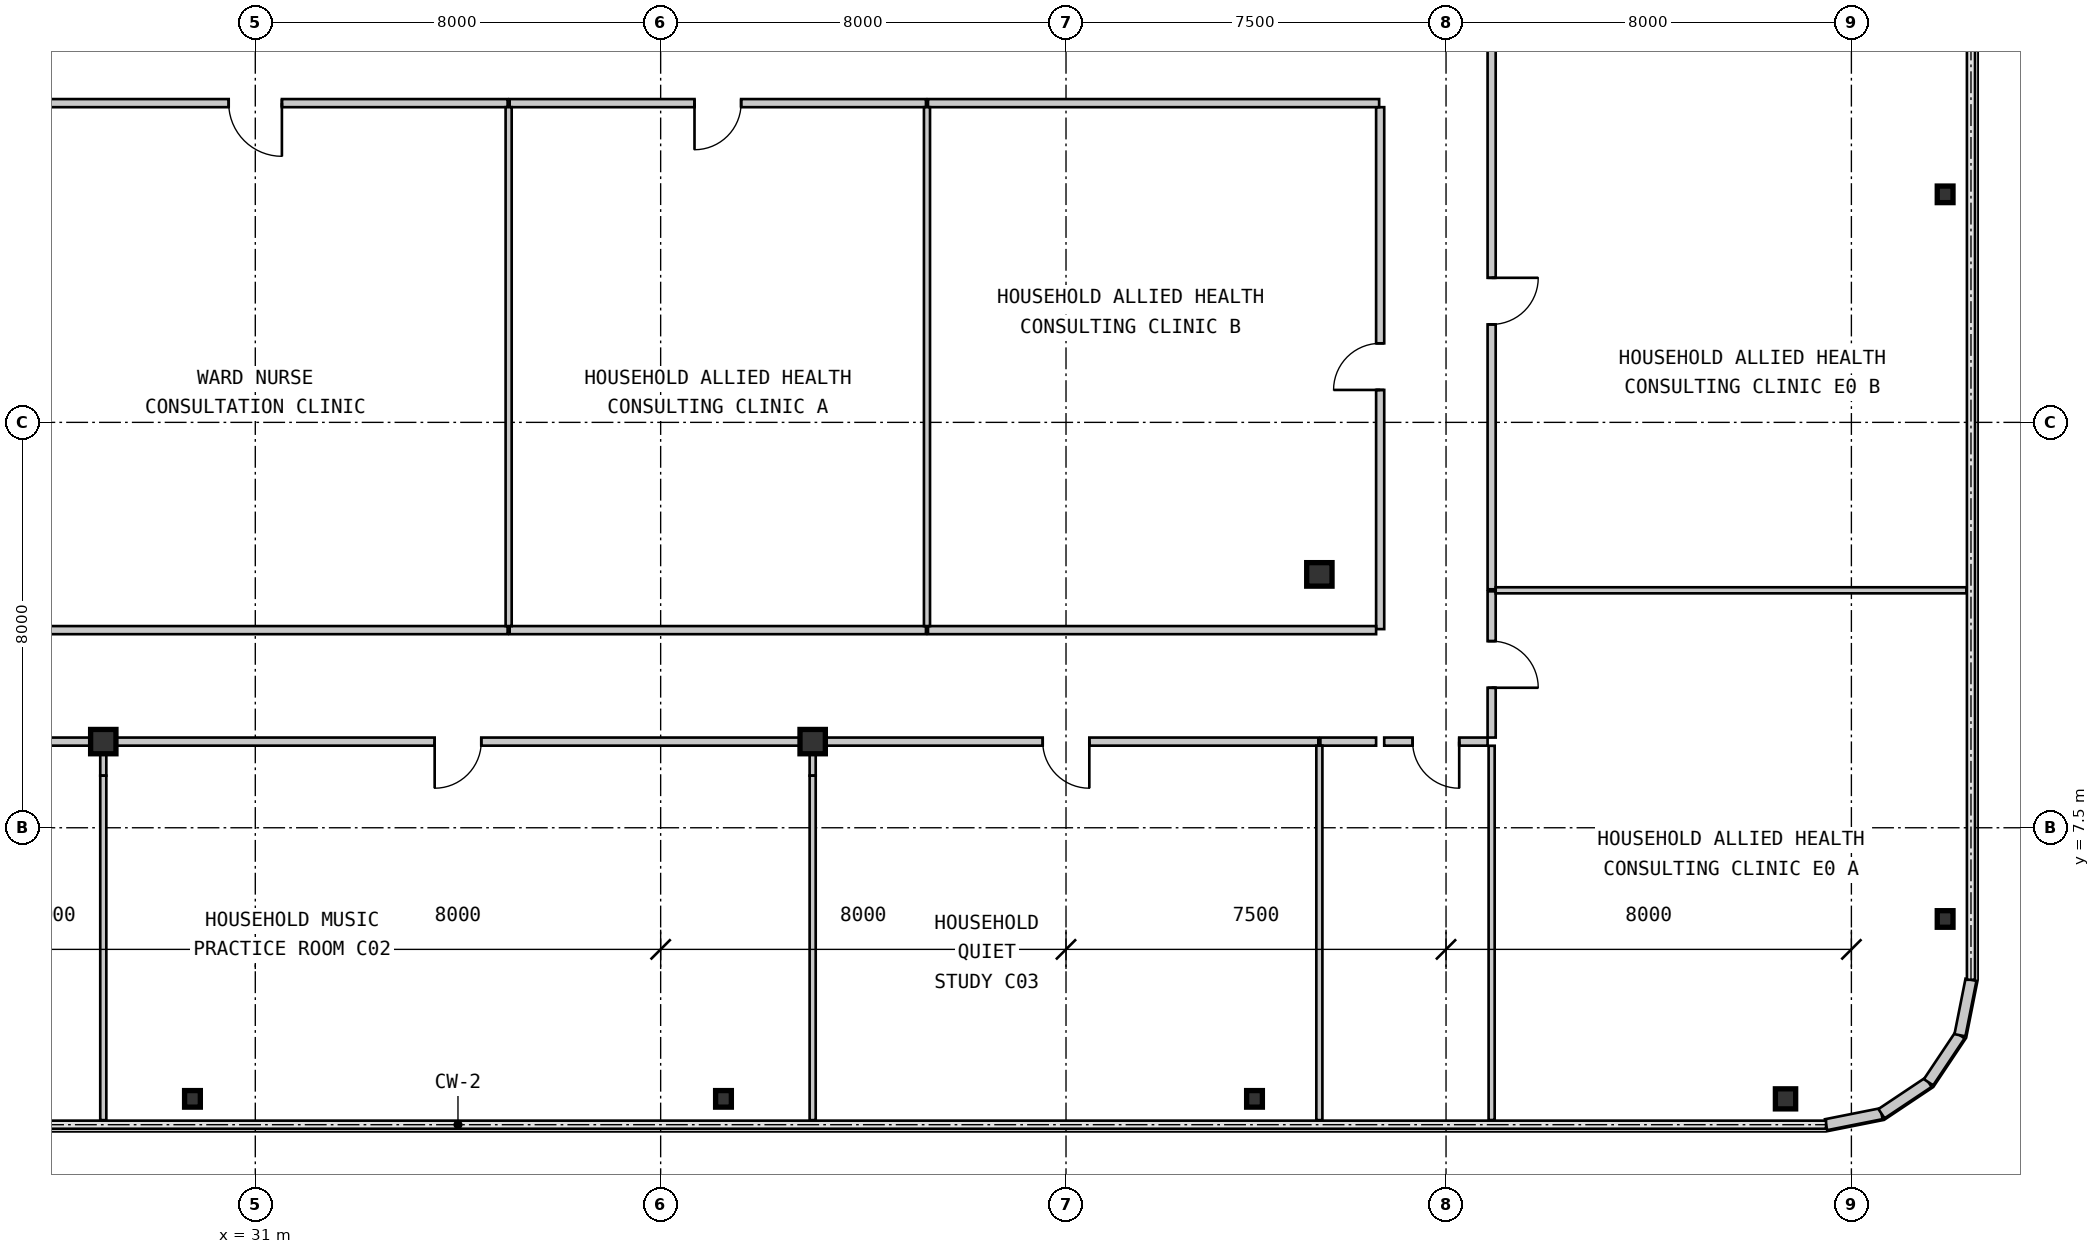
"""IFC4 building model, lengths in metres.
Left out: names, types, materials, properties, quantities, classifications, styles, units other than length and angle.
Written with IfcOpenShell. Run it as: python <this file> out.ifc"""

import sys

from ifc_helpers import new_model, si_unit, direction, frame, frame_2d, origin, origin_2d, place, context, subcontext, project, spatial, rectangle, i_section, extrude, source, transform, mapped, element, fill, save


model = new_model("IFC4")
c1 = context("Model", 3, precision=1e-05, world=origin(), true_north=direction((0.0, 1.0)))
c2 = subcontext(c1, "Body", "Model", "MODEL_VIEW")
j1 = project(units=[si_unit("LENGTHUNIT", "METRE"), si_unit("PLANEANGLEUNIT", "RADIAN")], contexts=[c1])
p1 = place(None, origin())
s1 = spatial("IfcSite", under=j1, at=p1, CompositionType="ELEMENT")
p2 = place(p1, origin())
s2 = spatial("IfcBuilding", under=s1, at=p2, CompositionType="ELEMENT")
p3 = place(p2, frame((0.0, 0.0, 57.75)))
s3 = spatial("IfcBuildingStorey", under=s2, at=p3, CompositionType="ELEMENT", Elevation=57.75)
m1 = source(origin(), c2, "Body", "SweptSolid", [
    extrude(i_section(OverallWidth=0.5, OverallDepth=0.48, WebThickness=0.028, FlangeThickness=0.044, at=origin_2d()), origin(), (0.0, 0.0, 1.0), 3.15),
])
for number, where, z_axis, x_axis in (
    (1, (28.0, 9.2, 0.0), (0.0, 0.0, 1.0), (1.0, 0.0, 0.0)),
    (2, (42.0, 9.2, 0.0), (0.0, 0.0, 1.0), (1.0, 0.0, 0.0)),
):
    element("IfcColumn", number, at=place(p3, frame(where, z_axis=z_axis, x_axis=x_axis)), inside=s3, PredefinedType="COLUMN", context=c2, shape_type="MappedRepresentation", body=[
        mapped(m1, transform((0.0, 0.0, 0.0), scale=1.0)),
    ])
m2 = source(origin(), c2, "Body", "SweptSolid", [
    extrude(i_section(OverallWidth=0.5, OverallDepth=0.464, WebThickness=0.022, FlangeThickness=0.034, at=origin_2d()), origin(), (0.0, 0.0, 1.0), 3.15),
])
p4 = place(p3, frame((52.0, 12.5, 0.0), z_axis=(0.0, 0.0, 1.0), x_axis=(1.0, 0.0, 0.0)))
e3 = element("IfcColumn", 3, at=p4, inside=s3, PredefinedType="COLUMN", context=c2, shape_type="MappedRepresentation", body=[
    mapped(m2, transform((0.0, 0.0, 0.0), scale=1.0)),
])
m3 = source(origin(), c2, "Body", "SweptSolid", [
    extrude(i_section(OverallWidth=0.311, OverallDepth=0.327, WebThickness=0.016, FlangeThickness=0.025, at=origin_2d()), origin(), (0.0, 0.0, 1.0), 3.15),
])
for number, where, z_axis, x_axis in (
    (4, (29.76, 2.15, 0.0), (0.0, 0.0, 1.0), (1.0, 0.0, 0.0)),
    (5, (40.24, 2.15, 0.0), (0.0, 0.0, 1.0), (1.0, 0.0, 0.0)),
    (6, (50.72, 2.15, 0.0), (0.0, 0.0, 1.0), (1.0, 0.0, 0.0)),
):
    element("IfcColumn", number, at=place(p3, frame(where, z_axis=z_axis, x_axis=x_axis)), inside=s3, PredefinedType="COLUMN", context=c2, shape_type="MappedRepresentation", body=[
        mapped(m3, transform((0.0, 0.0, 0.0), scale=1.0)),
    ])
m4 = source(origin(), c2, "Body", "SweptSolid", [
    extrude(i_section(OverallWidth=0.4, OverallDepth=0.396, WebThickness=0.022, FlangeThickness=0.034, at=origin_2d()), origin(), (0.0, 0.0, 1.0), 3.15),
])
p5 = place(p3, frame((61.2, 2.15, 0.0), z_axis=(0.0, 0.0, 1.0), x_axis=(1.0, 0.0, 0.0)))
e7 = element("IfcColumn", 7, at=p5, inside=s3, PredefinedType="COLUMN", context=c2, shape_type="MappedRepresentation", body=[
    mapped(m4, transform((0.0, 0.0, 0.0), scale=1.0)),
])
for number, where, z_axis, x_axis in (
    (8, (64.35, 5.7, 0.0), (0.0, 0.0, 1.0), (1.0, 0.0, 0.0)),
    (9, (64.35, 20.0, 0.0), (0.0, 0.0, 1.0), (1.0, 0.0, 0.0)),
):
    element("IfcColumn", number, at=place(p3, frame(where, z_axis=z_axis, x_axis=x_axis)), inside=s3, PredefinedType="COLUMN", context=c2, shape_type="MappedRepresentation", body=[
        mapped(m3, transform((0.0, 0.0, 0.0), scale=1.0)),
    ])
m5 = source(origin(), c2, "Body", "SweptSolid", [
    extrude(rectangle(XDim=1.116, YDim=0.22, at=frame_2d((0.558, 0.0))), origin(), (0.0, 0.0, 1.0), 2.87),
])
for number, where, z_axis, x_axis in (
    (10, (62.0, 1.64, 0.0), (0.0, 0.0, 1.0), (0.981, 0.195, 0.0)),
    (11, (63.094, 1.858, 0.0), (0.0, 0.0, 1.0), (0.831, 0.556, 0.0)),
    (12, (64.022, 2.478, 0.0), (0.0, 0.0, 1.0), (0.556, 0.831, 0.0)),
    (13, (64.642, 3.406, 0.0), (0.0, 0.0, 1.0), (0.195, 0.981, 0.0)),
):
    element("IfcWall", number, at=place(p3, frame(where, z_axis=z_axis, x_axis=x_axis)), inside=s3, PredefinedType="SOLIDWALL", context=c2, shape_type="MappedRepresentation", body=[
        mapped(m5, transform((0.0, 0.0, 0.0), scale=1.0)),
    ])
m6 = source(origin(), c2, "Body", "SweptSolid", [
    extrude(rectangle(XDim=9.959, YDim=0.16, at=frame_2d((4.98, 0.0))), origin(), (0.0, 0.0, 1.0), 2.87),
])
p6 = place(p3, frame((35.98, 21.8, 0.0), z_axis=(0.0, 0.0, 1.0), x_axis=(-1.0, 0.0, 0.0)))
e14 = element("IfcWall", 14, at=p6, inside=s3, PredefinedType="PARTITIONING", context=c2, shape_type="MappedRepresentation", body=[
    mapped(m6, transform((0.0, 0.0, 0.0), scale=1.0)),
])
m7 = source(origin(), c2, "Body", "SweptSolid", [
    extrude(rectangle(XDim=1.05, YDim=2.1, at=frame_2d((0.525, 1.05))), frame((0.0, 0.09, 0.0), z_axis=(0.0, -1.0, 0.0), x_axis=(1.0, 0.0, 0.0)), (0.0, 0.0, 1.0), 0.18),
])
p7 = place(p6, frame((4.455, 0.0, 0.0)))
e15 = element("IfcOpeningElement", 15, at=p7, cuts=e14, PredefinedType="OPENING", context=c2, shape_type="MappedRepresentation", body=[
    mapped(m7, transform((0.0, 0.0, 0.0), scale=1.0)),
])
m8 = source(origin(), c2, "Body", "SweptSolid", [
    extrude(rectangle(XDim=8.216, YDim=0.16, at=frame_2d((4.108, 0.0))), origin(), (0.0, 0.0, 1.0), 2.87),
])
p8 = place(p3, frame((44.236, 21.8, 0.0), z_axis=(0.0, 0.0, 1.0), x_axis=(-1.0, 0.0, 0.0)))
e16 = element("IfcWall", 16, at=p8, inside=s3, PredefinedType="PARTITIONING", context=c2, shape_type="MappedRepresentation", body=[
    mapped(m8, transform((0.0, 0.0, 0.0), scale=1.0)),
])
m9 = source(origin(), c2, "Body", "SweptSolid", [
    extrude(rectangle(XDim=0.92, YDim=2.1, at=frame_2d((0.46, 1.05))), frame((0.0, 0.09, 0.0), z_axis=(0.0, -1.0, 0.0), x_axis=(1.0, 0.0, 0.0)), (0.0, 0.0, 1.0), 0.18),
])
p9 = place(p8, frame((3.648, 0.0, 0.0)))
e17 = element("IfcOpeningElement", 17, at=p9, cuts=e16, PredefinedType="OPENING", context=c2, shape_type="MappedRepresentation", body=[
    mapped(m9, transform((0.0, 0.0, 0.0), scale=1.0)),
])
m10 = source(origin(), c2, "Body", "SweptSolid", [
    extrude(rectangle(XDim=10.3, YDim=0.16, at=frame_2d((5.15, 0.0))), origin(), (0.0, 0.0, 1.0), 2.87),
])
p10 = place(p3, frame((53.2, 11.42, 0.0), z_axis=(0.0, 0.0, 1.0), x_axis=(0.0, 1.0, 0.0)))
e18 = element("IfcWall", 18, at=p10, inside=s3, PredefinedType="PARTITIONING", context=c2, shape_type="MappedRepresentation", body=[
    mapped(m10, transform((0.0, 0.0, 0.0), scale=1.0)),
])
p11 = place(p10, frame((4.72, 0.0, 0.0)))
e19 = element("IfcOpeningElement", 19, at=p11, cuts=e18, PredefinedType="OPENING", context=c2, shape_type="MappedRepresentation", body=[
    mapped(m9, transform((0.0, 0.0, 0.0), scale=1.0)),
])
m11 = source(origin(), c2, "Body", "SweptSolid", [
    extrude(rectangle(XDim=8.904, YDim=0.16, at=frame_2d((4.452, 0.0))), origin(), (0.0, 0.0, 1.0), 2.87),
])
p12 = place(p3, frame((53.18, 21.8, 0.0), z_axis=(0.0, 0.0, 1.0), x_axis=(-1.0, 0.0, 0.0)))
e20 = element("IfcWall", 20, at=p12, inside=s3, PredefinedType="PARTITIONING", context=c2, shape_type="MappedRepresentation", body=[
    mapped(m11, transform((0.0, 0.0, 0.0), scale=1.0)),
])
m12 = source(origin(), c2, "Body", "SweptSolid", [
    extrude(rectangle(XDim=2.04, YDim=0.16, at=frame_2d((1.02, 0.0))), origin(), (0.0, 0.0, 1.0), 2.87),
])
p13 = place(p3, frame((55.32, 9.2, 0.0), z_axis=(0.0, 0.0, 1.0), x_axis=(-1.0, 0.0, 0.0)))
e21 = element("IfcWall", 21, at=p13, inside=s3, PredefinedType="PARTITIONING", context=c2, shape_type="MappedRepresentation", body=[
    mapped(m12, transform((0.0, 0.0, 0.0), scale=1.0)),
])
p14 = place(p13, frame((0.56, 0.0, 0.0)))
e22 = element("IfcOpeningElement", 22, at=p14, cuts=e21, PredefinedType="OPENING", context=c2, shape_type="MappedRepresentation", body=[
    mapped(m9, transform((0.0, 0.0, 0.0), scale=1.0)),
])
m13 = source(origin(), c2, "Body", "SweptSolid", [
    extrude(rectangle(XDim=2.886, YDim=0.16, at=frame_2d((1.443, 0.0))), origin(), (0.0, 0.0, 1.0), 2.87),
])
p15 = place(p3, frame((55.4, 12.166, 0.0), z_axis=(0.0, 0.0, 1.0), x_axis=(0.0, -1.0, 0.0)))
e23 = element("IfcWall", 23, at=p15, inside=s3, PredefinedType="PARTITIONING", context=c2, shape_type="MappedRepresentation", body=[
    mapped(m13, transform((0.0, 0.0, 0.0), scale=1.0)),
])
p16 = place(p15, frame((0.983, 0.0, 0.0)))
e24 = element("IfcOpeningElement", 24, at=p16, cuts=e23, PredefinedType="OPENING", context=c2, shape_type="MappedRepresentation", body=[
    mapped(m9, transform((0.0, 0.0, 0.0), scale=1.0)),
])
m14 = source(origin(), c2, "Body", "SweptSolid", [
    extrude(rectangle(XDim=11.373, YDim=0.16, at=frame_2d((5.687, 0.0))), origin(), (0.0, 0.0, 1.0), 2.87),
])
p17 = place(p3, frame((55.4, 23.579, 0.0), z_axis=(0.0, 0.0, 1.0), x_axis=(0.0, -1.0, 0.0)))
e25 = element("IfcWall", 25, at=p17, inside=s3, PredefinedType="PARTITIONING", context=c2, shape_type="MappedRepresentation", body=[
    mapped(m14, transform((0.0, 0.0, 0.0), scale=1.0)),
])
p18 = place(p17, frame((5.227, 0.0, 0.0)))
e26 = element("IfcOpeningElement", 26, at=p18, cuts=e25, PredefinedType="OPENING", context=c2, shape_type="MappedRepresentation", body=[
    mapped(m9, transform((0.0, 0.0, 0.0), scale=1.0)),
])
p19 = place(p3, frame((26.02, 11.4, 0.0), z_axis=(0.0, 0.0, 1.0), x_axis=(1.0, 0.0, 0.0)))
e27 = element("IfcWall", 27, at=p19, inside=s3, PredefinedType="PARTITIONING", context=c2, shape_type="MappedRepresentation", body=[
    mapped(m6, transform((0.0, 0.0, 0.0), scale=1.0)),
])
p20 = place(p3, frame((36.02, 11.4, 0.0), z_axis=(0.0, 0.0, 1.0), x_axis=(1.0, 0.0, 0.0)))
e28 = element("IfcWall", 28, at=p20, inside=s3, PredefinedType="PARTITIONING", context=c2, shape_type="MappedRepresentation", body=[
    mapped(m8, transform((0.0, 0.0, 0.0), scale=1.0)),
])
m15 = source(origin(), c2, "Body", "SweptSolid", [
    extrude(rectangle(XDim=8.844, YDim=0.16, at=frame_2d((4.422, 0.0))), origin(), (0.0, 0.0, 1.0), 2.87),
])
p21 = place(p3, frame((44.276, 11.4, 0.0), z_axis=(0.0, 0.0, 1.0), x_axis=(1.0, 0.0, 0.0)))
e29 = element("IfcWall", 29, at=p21, inside=s3, PredefinedType="PARTITIONING", context=c2, shape_type="MappedRepresentation", body=[
    mapped(m15, transform((0.0, 0.0, 0.0), scale=1.0)),
])
p22 = place(p3, frame((27.98, 9.2, 0.0), z_axis=(0.0, 0.0, 1.0), x_axis=(-1.0, 0.0, 0.0)))
e30 = element("IfcWall", 30, at=p22, inside=s3, PredefinedType="PARTITIONING", context=c2, shape_type="MappedRepresentation", body=[
    mapped(m6, transform((0.0, 0.0, 0.0), scale=1.0)),
])
p23 = place(p22, frame((4.52, 0.0, 0.0)))
e31 = element("IfcOpeningElement", 31, at=p23, cuts=e30, PredefinedType="OPENING", context=c2, shape_type="MappedRepresentation", body=[
    mapped(m9, transform((0.0, 0.0, 0.0), scale=1.0)),
])
m16 = source(origin(), c2, "Body", "SweptSolid", [
    extrude(rectangle(XDim=13.959, YDim=0.16, at=frame_2d((6.98, 0.0))), origin(), (0.0, 0.0, 1.0), 2.268),
])
p24 = place(p3, frame((41.98, 9.2, 0.0), z_axis=(0.0, 0.0, 1.0), x_axis=(-1.0, 0.0, 0.0)))
e32 = element("IfcWall", 32, at=p24, inside=s3, PredefinedType="PARTITIONING", context=c2, shape_type="MappedRepresentation", body=[
    mapped(m16, transform((0.0, 0.0, 0.0), scale=1.0)),
])
p25 = place(p24, frame((6.52, 0.0, 0.0)))
e33 = element("IfcOpeningElement", 33, at=p25, cuts=e32, PredefinedType="OPENING", context=c2, shape_type="MappedRepresentation", body=[
    mapped(m9, transform((0.0, 0.0, 0.0), scale=1.0)),
])
p26 = place(p3, frame((51.98, 9.2, 0.0), z_axis=(0.0, 0.0, 1.0), x_axis=(-1.0, 0.0, 0.0)))
e34 = element("IfcWall", 34, at=p26, inside=s3, PredefinedType="PARTITIONING", context=c2, shape_type="MappedRepresentation", body=[
    mapped(m6, transform((0.0, 0.0, 0.0), scale=1.0)),
])
p27 = place(p26, frame((4.52, 0.0, 0.0)))
e35 = element("IfcOpeningElement", 35, at=p27, cuts=e34, PredefinedType="OPENING", context=c2, shape_type="MappedRepresentation", body=[
    mapped(m9, transform((0.0, 0.0, 0.0), scale=1.0)),
])
m17 = source(origin(), c2, "Body", "SweptSolid", [
    extrude(rectangle(XDim=1.1, YDim=0.16, at=frame_2d((0.55, 0.0))), origin(), (0.0, 0.0, 1.0), 2.87),
])
p28 = place(p3, frame((53.12, 9.2, 0.0), z_axis=(0.0, 0.0, 1.0), x_axis=(-1.0, 0.0, 0.0)))
e36 = element("IfcWall", 36, at=p28, inside=s3, PredefinedType="PARTITIONING", context=c2, shape_type="MappedRepresentation", body=[
    mapped(m17, transform((0.0, 0.0, 0.0), scale=1.0)),
])
m18 = source(origin(), c2, "Body", "SweptSolid", [
    extrude(rectangle(XDim=10.24, YDim=0.12, at=frame_2d((5.12, 0.0))), origin(), (0.0, 0.0, 1.0), 2.87),
])
for number, where, z_axis, x_axis in (
    (37, (36.0, 21.72, 0.0), (0.0, 0.0, 1.0), (0.0, -1.0, 0.0)),
    (38, (44.256, 21.72, 0.0), (0.0, 0.0, 1.0), (0.0, -1.0, 0.0)),
):
    element("IfcWall", number, at=place(p3, frame(where, z_axis=z_axis, x_axis=x_axis)), inside=s3, PredefinedType="PARTITIONING", context=c2, shape_type="MappedRepresentation", body=[
        mapped(m18, transform((0.0, 0.0, 0.0), scale=1.0)),
    ])
m19 = source(origin(), c2, "Body", "SweptSolid", [
    extrude(rectangle(XDim=0.592, YDim=0.12, at=frame_2d((0.296, 0.0))), origin(), (0.0, 0.0, 1.0), 2.337),
])
p29 = place(p3, frame((28.0, 9.12, 0.0), z_axis=(0.0, 0.0, 1.0), x_axis=(0.0, -1.0, 0.0)))
e39 = element("IfcWall", 39, at=p29, inside=s3, PredefinedType="PARTITIONING", context=c2, shape_type="MappedRepresentation", body=[
    mapped(m19, transform((0.0, 0.0, 0.0), scale=1.0)),
])
m20 = source(origin(), c2, "Body", "SweptSolid", [
    extrude(rectangle(XDim=6.798, YDim=0.12, at=frame_2d((3.399, 0.0))), origin(), (0.0, 0.0, 1.0), 2.87),
])
p30 = place(p3, frame((28.0, 8.528, 0.0), z_axis=(0.0, 0.0, 1.0), x_axis=(0.0, -1.0, 0.0)))
e40 = element("IfcWall", 40, at=p30, inside=s3, PredefinedType="PARTITIONING", context=c2, shape_type="MappedRepresentation", body=[
    mapped(m20, transform((0.0, 0.0, 0.0), scale=1.0)),
])
p31 = place(p3, frame((42.0, 9.12, 0.0), z_axis=(0.0, 0.0, 1.0), x_axis=(0.0, -1.0, 0.0)))
e41 = element("IfcWall", 41, at=p31, inside=s3, PredefinedType="PARTITIONING", context=c2, shape_type="MappedRepresentation", body=[
    mapped(m19, transform((0.0, 0.0, 0.0), scale=1.0)),
])
p32 = place(p3, frame((42.0, 8.528, 0.0), z_axis=(0.0, 0.0, 1.0), x_axis=(0.0, -1.0, 0.0)))
e42 = element("IfcWall", 42, at=p32, inside=s3, PredefinedType="PARTITIONING", context=c2, shape_type="MappedRepresentation", body=[
    mapped(m20, transform((0.0, 0.0, 0.0), scale=1.0)),
])
m21 = source(origin(), c2, "Body", "SweptSolid", [
    extrude(rectangle(XDim=7.39, YDim=0.12, at=frame_2d((3.695, 0.0))), origin(), (0.0, 0.0, 1.0), 2.87),
])
p33 = place(p3, frame((52.0, 9.12, 0.0), z_axis=(0.0, 0.0, 1.0), x_axis=(0.0, -1.0, 0.0)))
e43 = element("IfcWall", 43, at=p33, inside=s3, PredefinedType="PARTITIONING", context=c2, shape_type="MappedRepresentation", body=[
    mapped(m21, transform((0.0, 0.0, 0.0), scale=1.0)),
])
m22 = source(origin(), c2, "Body", "SweptSolid", [
    extrude(rectangle(XDim=7.386, YDim=0.12, at=frame_2d((3.693, 0.0))), origin(), (0.0, 0.0, 1.0), 2.87),
])
p34 = place(p3, frame((55.4, 9.118, 0.0), z_axis=(0.0, 0.0, 1.0), x_axis=(0.0, -1.0, 0.0)))
e44 = element("IfcWall", 44, at=p34, inside=s3, PredefinedType="PARTITIONING", context=c2, shape_type="MappedRepresentation", body=[
    mapped(m22, transform((0.0, 0.0, 0.0), scale=1.0)),
])
m23 = source(origin(), c2, "Body", "SweptSolid", [
    extrude(rectangle(XDim=9.29, YDim=0.12, at=frame_2d((4.645, 0.0))), origin(), (0.0, 0.0, 1.0), 2.87),
])
p35 = place(p3, frame((55.48, 12.186, 0.0), z_axis=(0.0, 0.0, 1.0), x_axis=(1.0, 0.0, 0.0)))
e45 = element("IfcWall", 45, at=p35, inside=s3, PredefinedType="PARTITIONING", context=c2, shape_type="MappedRepresentation", body=[
    mapped(m23, transform((0.0, 0.0, 0.0), scale=1.0)),
])
m24 = source(origin(), c2, "Body", "SweptSolid", [
    extrude(rectangle(XDim=1.05, YDim=2.1, at=frame_2d((0.525, 1.05))), frame((0.0, 0.025, 0.0), z_axis=(0.0, -1.0, 0.0), x_axis=(1.0, 0.0, 0.0)), (0.0, 0.0, 1.0), 0.05),
])
p36 = place(p7, origin())
e46 = element("IfcDoor", 46, at=p36, inside=s3, OperationType="SINGLE_SWING_LEFT", PredefinedType="DOOR", context=c2, shape_type="MappedRepresentation", body=[
    mapped(m24, transform((0.0, 0.0, 0.0), scale=1.0)),
])
fill(e15, e46)
m25 = source(origin(), c2, "Body", "SweptSolid", [
    extrude(rectangle(XDim=0.92, YDim=2.1, at=frame_2d((0.46, 1.05))), frame((0.0, 0.025, 0.0), z_axis=(0.0, -1.0, 0.0), x_axis=(1.0, 0.0, 0.0)), (0.0, 0.0, 1.0), 0.05),
])
p37 = place(p9, origin())
e47 = element("IfcDoor", 47, at=p37, inside=s3, OperationType="SINGLE_SWING_RIGHT", PredefinedType="DOOR", context=c2, shape_type="MappedRepresentation", body=[
    mapped(m25, transform((0.0, 0.0, 0.0), scale=1.0)),
])
fill(e17, e47)
p38 = place(p11, origin())
e48 = element("IfcDoor", 48, at=p38, inside=s3, OperationType="SINGLE_SWING_LEFT", PredefinedType="DOOR", context=c2, shape_type="MappedRepresentation", body=[
    mapped(m25, transform((0.0, 0.0, 0.0), scale=1.0)),
])
fill(e19, e48)
p39 = place(p14, origin())
e49 = element("IfcDoor", 49, at=p39, inside=s3, OperationType="SINGLE_SWING_LEFT", PredefinedType="DOOR", context=c2, shape_type="MappedRepresentation", body=[
    mapped(m25, transform((0.0, 0.0, 0.0), scale=1.0)),
])
fill(e22, e49)
p40 = place(p16, origin())
e50 = element("IfcDoor", 50, at=p40, inside=s3, OperationType="SINGLE_SWING_RIGHT", PredefinedType="DOOR", context=c2, shape_type="MappedRepresentation", body=[
    mapped(m25, transform((0.0, 0.0, 0.0), scale=1.0)),
])
fill(e24, e50)
p41 = place(p18, origin())
e51 = element("IfcDoor", 51, at=p41, inside=s3, OperationType="SINGLE_SWING_LEFT", PredefinedType="DOOR", context=c2, shape_type="MappedRepresentation", body=[
    mapped(m25, transform((0.0, 0.0, 0.0), scale=1.0)),
])
fill(e26, e51)
p42 = place(p25, origin())
e52 = element("IfcDoor", 52, at=p42, inside=s3, OperationType="SINGLE_SWING_RIGHT", PredefinedType="DOOR", context=c2, shape_type="MappedRepresentation", body=[
    mapped(m25, transform((0.0, 0.0, 0.0), scale=1.0)),
])
fill(e33, e52)
p43 = place(p27, origin())
e53 = element("IfcDoor", 53, at=p43, inside=s3, OperationType="SINGLE_SWING_LEFT", PredefinedType="DOOR", context=c2, shape_type="MappedRepresentation", body=[
    mapped(m25, transform((0.0, 0.0, 0.0), scale=1.0)),
])
fill(e35, e53)
save(model, sys.argv[1])
